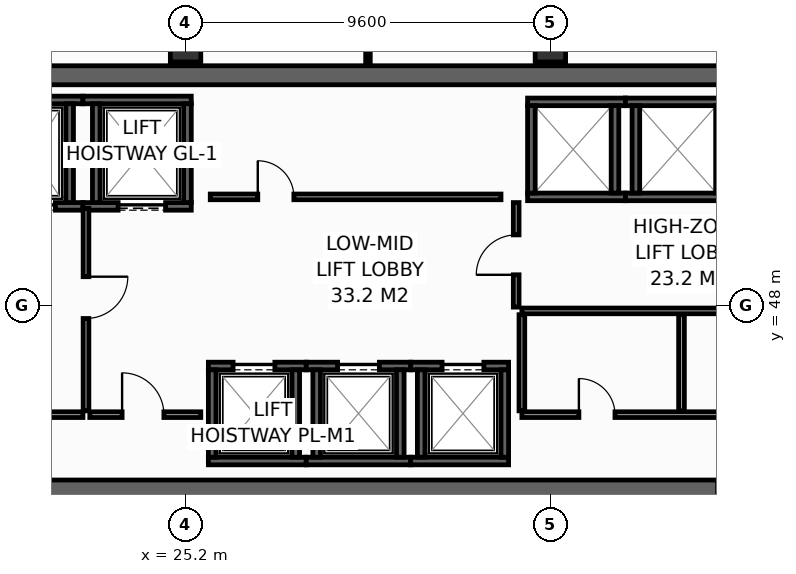
"""IFC4 building model, lengths in metres.
Left out: names, types, materials, properties, quantities, classifications, styles, units other than length and angle.
Written with IfcOpenShell. Run it as: python <this file> out.ifc"""

import sys

from ifc_helpers import new_model, si_unit, direction, frame, frame_2d, origin, origin_2d, place, context, subcontext, project, spatial, rectangle, hollow_rectangle, extrude, element, fill, save


model = new_model("IFC4")
c1 = context("Model", 3, precision=1e-05, world=origin(), true_north=direction((0.0, 1.0)))
c2 = subcontext(c1, "Body", "Model", "MODEL_VIEW")
j1 = project(units=[si_unit("LENGTHUNIT", "METRE"), si_unit("PLANEANGLEUNIT", "RADIAN")], contexts=[c1])
p1 = place(None, origin())
s1 = spatial("IfcSite", under=j1, at=p1, CompositionType="ELEMENT")
p2 = place(p1, origin())
s2 = spatial("IfcBuilding", under=s1, at=p2, CompositionType="ELEMENT")
p3 = place(p2, frame((0.0, 0.0, 190.4)))
s3 = spatial("IfcBuildingStorey", under=s2, at=p3, CompositionType="ELEMENT", Elevation=190.4)
p4 = place(p3, frame((13.6, 43.15, 0.0), z_axis=(0.0, 0.0, 1.0), x_axis=(1.0, 0.0, 0.0)))
e1 = element("IfcWall", 1, at=p4, inside=s3, PredefinedType="SHEAR", context=c2, shape_type="SweptSolid", body=[
    extrude(rectangle(XDim=32.7, YDim=0.5, at=frame_2d((16.35, 0.0))), origin(), (0.0, 0.0, 1.0), 3.55),
])
p5 = place(p4, frame((5.4, 0.0, 0.0)))
e2 = element("IfcOpeningElement", 2, at=p5, cuts=e1, PredefinedType="OPENING", context=c2, shape_type="SweptSolid", body=[
    extrude(rectangle(XDim=1.1, YDim=2.15, at=frame_2d((0.55, 1.075))), frame((0.0, 0.26, 0.0), z_axis=(0.0, -1.0, 0.0), x_axis=(1.0, 0.0, 0.0)), (0.0, 0.0, 1.0), 0.52),
])
p6 = place(p4, frame((25.6, 0.0, 0.0)))
e3 = element("IfcOpeningElement", 3, at=p6, cuts=e1, PredefinedType="OPENING", context=c2, shape_type="SweptSolid", body=[
    extrude(rectangle(XDim=1.1, YDim=2.15, at=frame_2d((0.55, 1.075))), frame((0.0, 0.26, 0.0), z_axis=(0.0, -1.0, 0.0), x_axis=(1.0, 0.0, 0.0)), (0.0, 0.0, 1.0), 0.52),
])
p7 = place(p3, frame((13.6, 54.05, 0.0), z_axis=(0.0, 0.0, 1.0), x_axis=(1.0, 0.0, 0.0)))
e4 = element("IfcWall", 4, at=p7, inside=s3, PredefinedType="SHEAR", context=c2, shape_type="SweptSolid", body=[
    extrude(rectangle(XDim=32.7, YDim=0.5, at=frame_2d((16.35, 0.0))), origin(), (0.0, 0.0, 1.0), 3.55),
])
for number, where, z_axis, x_axis in (
    (5, (25.2, 54.8, 0.0), (0.0, 0.0, 1.0), (1.0, 0.0, 0.0)),
    (6, (34.8, 54.8, 0.0), (0.0, 0.0, 1.0), (1.0, 0.0, 0.0)),
):
    element("IfcColumn", number, at=place(p3, frame(where, z_axis=z_axis, x_axis=x_axis)), inside=s3, PredefinedType="COLUMN", context=c2, shape_type="SweptSolid", body=[
        extrude(hollow_rectangle(XDim=0.8, YDim=0.8, WallThickness=0.036, at=origin_2d()), origin(), (0.0, 0.0, 1.0), 3.8),
    ])
p8 = place(p3, frame((19.85, 50.6, 0.0), z_axis=(0.0, 0.0, 1.0), x_axis=(1.0, 0.0, 0.0)))
e7 = element("IfcWall", 7, at=p8, inside=s3, PredefinedType="SHEAR", context=c2, shape_type="SweptSolid", body=[
    extrude(rectangle(XDim=2.65, YDim=0.2, at=frame_2d((1.325, 0.0))), origin(), (0.0, 0.0, 1.0), 3.55),
])
p9 = place(p8, frame((0.675, 0.0, 0.0)))
e8 = element("IfcOpeningElement", 8, at=p9, cuts=e7, PredefinedType="OPENING", context=c2, shape_type="SweptSolid", body=[
    extrude(rectangle(XDim=1.25, YDim=2.3, at=frame_2d((0.625, 1.15))), frame((0.0, 0.11, 0.0), z_axis=(0.0, -1.0, 0.0), x_axis=(1.0, 0.0, 0.0)), (0.0, 0.0, 1.0), 0.22),
])
p10 = place(p3, frame((19.85, 53.4, 0.0), z_axis=(0.0, 0.0, 1.0), x_axis=(1.0, 0.0, 0.0)))
e9 = element("IfcWall", 9, at=p10, inside=s3, PredefinedType="SHEAR", context=c2, shape_type="SweptSolid", body=[
    extrude(rectangle(XDim=2.65, YDim=0.2, at=frame_2d((1.325, 0.0))), origin(), (0.0, 0.0, 1.0), 3.55),
])
p11 = place(p3, frame((22.15, 50.7, 0.0), z_axis=(0.0, 0.0, 1.0), x_axis=(0.0, 1.0, 0.0)))
e10 = element("IfcWall", 10, at=p11, inside=s3, PredefinedType="SHEAR", context=c2, shape_type="SweptSolid", body=[
    extrude(rectangle(XDim=2.6, YDim=0.2, at=frame_2d((1.3, 0.0))), origin(), (0.0, 0.0, 1.0), 3.55),
])
p12 = place(p3, frame((22.5, 50.6, 0.0), z_axis=(0.0, 0.0, 1.0), x_axis=(1.0, 0.0, 0.0)))
e11 = element("IfcWall", 11, at=p12, inside=s3, PredefinedType="SHEAR", context=c2, shape_type="SweptSolid", body=[
    extrude(rectangle(XDim=2.85, YDim=0.2, at=frame_2d((1.425, 0.0))), origin(), (0.0, 0.0, 1.0), 3.55),
])
p13 = place(p12, frame((0.925, 0.0, 0.0)))
e12 = element("IfcOpeningElement", 12, at=p13, cuts=e11, PredefinedType="OPENING", context=c2, shape_type="SweptSolid", body=[
    extrude(rectangle(XDim=1.25, YDim=2.3, at=frame_2d((0.625, 1.15))), frame((0.0, 0.11, 0.0), z_axis=(0.0, -1.0, 0.0), x_axis=(1.0, 0.0, 0.0)), (0.0, 0.0, 1.0), 0.22),
])
p14 = place(p3, frame((22.5, 53.4, 0.0), z_axis=(0.0, 0.0, 1.0), x_axis=(1.0, 0.0, 0.0)))
e13 = element("IfcWall", 13, at=p14, inside=s3, PredefinedType="SHEAR", context=c2, shape_type="SweptSolid", body=[
    extrude(rectangle(XDim=2.85, YDim=0.2, at=frame_2d((1.425, 0.0))), origin(), (0.0, 0.0, 1.0), 3.55),
])
for number, where, z_axis, x_axis in (
    (14, (22.85, 50.7, 0.0), (0.0, 0.0, 1.0), (0.0, 1.0, 0.0)),
    (15, (25.25, 50.7, 0.0), (0.0, 0.0, 1.0), (0.0, 1.0, 0.0)),
):
    element("IfcWall", number, at=place(p3, frame(where, z_axis=z_axis, x_axis=x_axis)), inside=s3, PredefinedType="SHEAR", context=c2, shape_type="SweptSolid", body=[
        extrude(rectangle(XDim=2.6, YDim=0.2, at=frame_2d((1.3, 0.0))), origin(), (0.0, 0.0, 1.0), 3.55),
    ])
p15 = place(p3, frame((25.8, 43.9, 0.0), z_axis=(0.0, 0.0, 1.0), x_axis=(1.0, 0.0, 0.0)))
e16 = element("IfcWall", 16, at=p15, inside=s3, PredefinedType="SHEAR", context=c2, shape_type="SweptSolid", body=[
    extrude(rectangle(XDim=2.575, YDim=0.2, at=frame_2d((1.288, 0.0))), origin(), (0.0, 0.0, 1.0), 3.55),
])
p16 = place(p3, frame((25.8, 46.4, 0.0), z_axis=(0.0, 0.0, 1.0), x_axis=(1.0, 0.0, 0.0)))
e17 = element("IfcWall", 17, at=p16, inside=s3, PredefinedType="SHEAR", context=c2, shape_type="SweptSolid", body=[
    extrude(rectangle(XDim=2.575, YDim=0.2, at=frame_2d((1.288, 0.0))), origin(), (0.0, 0.0, 1.0), 3.55),
])
p17 = place(p16, frame((0.65, 0.0, 0.0)))
e18 = element("IfcOpeningElement", 18, at=p17, cuts=e17, PredefinedType="OPENING", context=c2, shape_type="SweptSolid", body=[
    extrude(rectangle(XDim=1.1, YDim=2.2, at=frame_2d((0.55, 1.1))), frame((0.0, 0.11, 0.0), z_axis=(0.0, -1.0, 0.0), x_axis=(1.0, 0.0, 0.0)), (0.0, 0.0, 1.0), 0.22),
])
for number, where, z_axis, x_axis in (
    (19, (25.9, 44.0, 0.0), (0.0, 0.0, 1.0), (0.0, 1.0, 0.0)),
    (20, (28.1, 44.0, 0.0), (0.0, 0.0, 1.0), (0.0, 1.0, 0.0)),
):
    element("IfcWall", number, at=place(p3, frame(where, z_axis=z_axis, x_axis=x_axis)), inside=s3, PredefinedType="SHEAR", context=c2, shape_type="SweptSolid", body=[
        extrude(rectangle(XDim=2.3, YDim=0.2, at=frame_2d((1.15, 0.0))), origin(), (0.0, 0.0, 1.0), 3.55),
    ])
p18 = place(p3, frame((28.375, 43.9, 0.0), z_axis=(0.0, 0.0, 1.0), x_axis=(1.0, 0.0, 0.0)))
e21 = element("IfcWall", 21, at=p18, inside=s3, PredefinedType="SHEAR", context=c2, shape_type="SweptSolid", body=[
    extrude(rectangle(XDim=2.75, YDim=0.2, at=frame_2d((1.375, 0.0))), origin(), (0.0, 0.0, 1.0), 3.55),
])
p19 = place(p3, frame((28.375, 46.4, 0.0), z_axis=(0.0, 0.0, 1.0), x_axis=(1.0, 0.0, 0.0)))
e22 = element("IfcWall", 22, at=p19, inside=s3, PredefinedType="SHEAR", context=c2, shape_type="SweptSolid", body=[
    extrude(rectangle(XDim=2.75, YDim=0.2, at=frame_2d((1.375, 0.0))), origin(), (0.0, 0.0, 1.0), 3.55),
])
p20 = place(p19, frame((0.825, 0.0, 0.0)))
e23 = element("IfcOpeningElement", 23, at=p20, cuts=e22, PredefinedType="OPENING", context=c2, shape_type="SweptSolid", body=[
    extrude(rectangle(XDim=1.1, YDim=2.2, at=frame_2d((0.55, 1.1))), frame((0.0, 0.11, 0.0), z_axis=(0.0, -1.0, 0.0), x_axis=(1.0, 0.0, 0.0)), (0.0, 0.0, 1.0), 0.22),
])
for number, where, z_axis, x_axis in (
    (24, (28.65, 44.0, 0.0), (0.0, 0.0, 1.0), (0.0, 1.0, 0.0)),
    (25, (30.85, 44.0, 0.0), (0.0, 0.0, 1.0), (0.0, 1.0, 0.0)),
):
    element("IfcWall", number, at=place(p3, frame(where, z_axis=z_axis, x_axis=x_axis)), inside=s3, PredefinedType="SHEAR", context=c2, shape_type="SweptSolid", body=[
        extrude(rectangle(XDim=2.3, YDim=0.2, at=frame_2d((1.15, 0.0))), origin(), (0.0, 0.0, 1.0), 3.55),
    ])
p21 = place(p3, frame((31.125, 43.9, 0.0), z_axis=(0.0, 0.0, 1.0), x_axis=(1.0, 0.0, 0.0)))
e26 = element("IfcWall", 26, at=p21, inside=s3, PredefinedType="SHEAR", context=c2, shape_type="SweptSolid", body=[
    extrude(rectangle(XDim=2.575, YDim=0.2, at=frame_2d((1.288, 0.0))), origin(), (0.0, 0.0, 1.0), 3.55),
])
p22 = place(p3, frame((31.125, 46.4, 0.0), z_axis=(0.0, 0.0, 1.0), x_axis=(1.0, 0.0, 0.0)))
e27 = element("IfcWall", 27, at=p22, inside=s3, PredefinedType="SHEAR", context=c2, shape_type="SweptSolid", body=[
    extrude(rectangle(XDim=2.575, YDim=0.2, at=frame_2d((1.288, 0.0))), origin(), (0.0, 0.0, 1.0), 3.55),
])
p23 = place(p22, frame((0.825, 0.0, 0.0)))
e28 = element("IfcOpeningElement", 28, at=p23, cuts=e27, PredefinedType="OPENING", context=c2, shape_type="SweptSolid", body=[
    extrude(rectangle(XDim=1.1, YDim=2.2, at=frame_2d((0.55, 1.1))), frame((0.0, 0.11, 0.0), z_axis=(0.0, -1.0, 0.0), x_axis=(1.0, 0.0, 0.0)), (0.0, 0.0, 1.0), 0.22),
])
for number, where, z_axis, x_axis in (
    (29, (31.4, 44.0, 0.0), (0.0, 0.0, 1.0), (0.0, 1.0, 0.0)),
    (30, (33.6, 44.0, 0.0), (0.0, 0.0, 1.0), (0.0, 1.0, 0.0)),
):
    element("IfcWall", number, at=place(p3, frame(where, z_axis=z_axis, x_axis=x_axis)), inside=s3, PredefinedType="SHEAR", context=c2, shape_type="SweptSolid", body=[
        extrude(rectangle(XDim=2.3, YDim=0.2, at=frame_2d((1.15, 0.0))), origin(), (0.0, 0.0, 1.0), 3.55),
    ])
for number, where, z_axis, x_axis in (
    (31, (34.2, 50.85, 0.0), (0.0, 0.0, 1.0), (1.0, 0.0, 0.0)),
    (32, (34.2, 53.35, 0.0), (0.0, 0.0, 1.0), (1.0, 0.0, 0.0)),
):
    element("IfcWall", number, at=place(p3, frame(where, z_axis=z_axis, x_axis=x_axis)), inside=s3, PredefinedType="SHEAR", context=c2, shape_type="SweptSolid", body=[
        extrude(rectangle(XDim=2.575, YDim=0.2, at=frame_2d((1.288, 0.0))), origin(), (0.0, 0.0, 1.0), 3.55),
    ])
for number, where, z_axis, x_axis in (
    (33, (34.3, 50.95, 0.0), (0.0, 0.0, 1.0), (0.0, 1.0, 0.0)),
    (34, (36.5, 50.95, 0.0), (0.0, 0.0, 1.0), (0.0, 1.0, 0.0)),
):
    element("IfcWall", number, at=place(p3, frame(where, z_axis=z_axis, x_axis=x_axis)), inside=s3, PredefinedType="SHEAR", context=c2, shape_type="SweptSolid", body=[
        extrude(rectangle(XDim=2.3, YDim=0.2, at=frame_2d((1.15, 0.0))), origin(), (0.0, 0.0, 1.0), 3.55),
    ])
for number, where, z_axis, x_axis in (
    (35, (36.775, 50.85, 0.0), (0.0, 0.0, 1.0), (1.0, 0.0, 0.0)),
    (36, (36.775, 53.35, 0.0), (0.0, 0.0, 1.0), (1.0, 0.0, 0.0)),
):
    element("IfcWall", number, at=place(p3, frame(where, z_axis=z_axis, x_axis=x_axis)), inside=s3, PredefinedType="SHEAR", context=c2, shape_type="SweptSolid", body=[
        extrude(rectangle(XDim=2.75, YDim=0.2, at=frame_2d((1.375, 0.0))), origin(), (0.0, 0.0, 1.0), 3.55),
    ])
p24 = place(p3, frame((37.05, 50.95, 0.0), z_axis=(0.0, 0.0, 1.0), x_axis=(0.0, 1.0, 0.0)))
e37 = element("IfcWall", 37, at=p24, inside=s3, PredefinedType="SHEAR", context=c2, shape_type="SweptSolid", body=[
    extrude(rectangle(XDim=2.3, YDim=0.2, at=frame_2d((1.15, 0.0))), origin(), (0.0, 0.0, 1.0), 3.55),
])
p25 = place(p3, frame((17.36, 45.12, 0.0), z_axis=(0.0, 0.0, 1.0), x_axis=(1.0, 0.0, 0.0)))
e38 = element("IfcWall", 38, at=p25, inside=s3, PredefinedType="PARTITIONING", context=c2, shape_type="SweptSolid", body=[
    extrude(rectangle(XDim=5.14, YDim=0.15, at=frame_2d((2.57, 0.0))), origin(), (0.0, 0.0, 1.0), 3.55),
])
p26 = place(p25, frame((1.8, 0.0, 0.0)))
e39 = element("IfcOpeningElement", 39, at=p26, cuts=e38, PredefinedType="OPENING", context=c2, shape_type="SweptSolid", body=[
    extrude(rectangle(XDim=1.1, YDim=2.15, at=frame_2d((0.55, 1.075))), frame((0.0, 0.085, 0.0), z_axis=(0.0, -1.0, 0.0), x_axis=(1.0, 0.0, 0.0)), (0.0, 0.0, 1.0), 0.17),
])
p27 = place(p3, frame((22.58, 50.55, 0.0), z_axis=(0.0, 0.0, 1.0), x_axis=(0.0, -1.0, 0.0)))
e40 = element("IfcWall", 40, at=p27, inside=s3, PredefinedType="PARTITIONING", context=c2, shape_type="SweptSolid", body=[
    extrude(rectangle(XDim=5.33, YDim=0.15, at=frame_2d((2.665, 0.0))), origin(), (0.0, 0.0, 1.0), 3.55),
])
p28 = place(p27, frame((1.8, 0.0, 0.0)))
e41 = element("IfcOpeningElement", 41, at=p28, cuts=e40, PredefinedType="OPENING", context=c2, shape_type="SweptSolid", body=[
    extrude(rectangle(XDim=1.1, YDim=2.15, at=frame_2d((0.55, 1.075))), frame((0.0, 0.085, 0.0), z_axis=(0.0, -1.0, 0.0), x_axis=(1.0, 0.0, 0.0)), (0.0, 0.0, 1.0), 0.17),
])
p29 = place(p3, frame((22.68, 45.12, 0.0), z_axis=(0.0, 0.0, 1.0), x_axis=(1.0, 0.0, 0.0)))
e42 = element("IfcWall", 42, at=p29, inside=s3, PredefinedType="PARTITIONING", context=c2, shape_type="SweptSolid", body=[
    extrude(rectangle(XDim=2.92, YDim=0.15, at=frame_2d((1.46, 0.0))), origin(), (0.0, 0.0, 1.0), 3.55),
])
p30 = place(p29, frame((0.85, 0.0, 0.0)))
e43 = element("IfcOpeningElement", 43, at=p30, cuts=e42, PredefinedType="OPENING", context=c2, shape_type="SweptSolid", body=[
    extrude(rectangle(XDim=1.1, YDim=2.15, at=frame_2d((0.55, 1.075))), frame((0.0, 0.085, 0.0), z_axis=(0.0, -1.0, 0.0), x_axis=(1.0, 0.0, 0.0)), (0.0, 0.0, 1.0), 0.17),
])
p31 = place(p3, frame((33.9, 47.95, 0.0), z_axis=(0.0, 0.0, 1.0), x_axis=(0.0, 1.0, 0.0)))
e44 = element("IfcWall", 44, at=p31, inside=s3, PredefinedType="PARTITIONING", context=c2, shape_type="SweptSolid", body=[
    extrude(rectangle(XDim=2.75, YDim=0.15, at=frame_2d((1.375, 0.0))), origin(), (0.0, 0.0, 1.0), 3.55),
])
p32 = place(p31, frame((0.85, 0.0, 0.0)))
e45 = element("IfcOpeningElement", 45, at=p32, cuts=e44, PredefinedType="OPENING", context=c2, shape_type="SweptSolid", body=[
    extrude(rectangle(XDim=1.05, YDim=2.15, at=frame_2d((0.525, 1.075))), frame((0.0, 0.085, 0.0), z_axis=(0.0, -1.0, 0.0), x_axis=(1.0, 0.0, 0.0)), (0.0, 0.0, 1.0), 0.17),
])
p33 = place(p3, frame((34.05, 45.12, 0.0), z_axis=(0.0, 0.0, 1.0), x_axis=(1.0, 0.0, 0.0)))
e46 = element("IfcWall", 46, at=p33, inside=s3, PredefinedType="PARTITIONING", context=c2, shape_type="SweptSolid", body=[
    extrude(rectangle(XDim=8.45, YDim=0.15, at=frame_2d((4.225, 0.0))), origin(), (0.0, 0.0, 1.0), 3.55),
])
p34 = place(p33, frame((1.5, 0.0, 0.0)))
e47 = element("IfcOpeningElement", 47, at=p34, cuts=e46, PredefinedType="OPENING", context=c2, shape_type="SweptSolid", body=[
    extrude(rectangle(XDim=0.95, YDim=2.15, at=frame_2d((0.475, 1.075))), frame((0.0, 0.085, 0.0), z_axis=(0.0, -1.0, 0.0), x_axis=(1.0, 0.0, 0.0)), (0.0, 0.0, 1.0), 0.17),
])
p35 = place(p33, frame((5.8, 0.0, 0.0)))
e48 = element("IfcOpeningElement", 48, at=p35, cuts=e46, PredefinedType="OPENING", context=c2, shape_type="SweptSolid", body=[
    extrude(rectangle(XDim=0.95, YDim=2.15, at=frame_2d((0.475, 1.075))), frame((0.0, 0.085, 0.0), z_axis=(0.0, -1.0, 0.0), x_axis=(1.0, 0.0, 0.0)), (0.0, 0.0, 1.0), 0.17),
])
p36 = place(p3, frame((34.05, 47.85, 0.0), z_axis=(0.0, 0.0, 1.0), x_axis=(1.0, 0.0, 0.0)))
e49 = element("IfcWall", 49, at=p36, inside=s3, PredefinedType="PARTITIONING", context=c2, shape_type="SweptSolid", body=[
    extrude(rectangle(XDim=8.45, YDim=0.15, at=frame_2d((4.225, 0.0))), origin(), (0.0, 0.0, 1.0), 3.55),
])
for number, where, z_axis, x_axis in (
    (50, (38.25, 45.22, 0.0), (0.0, 0.0, 1.0), (0.0, 1.0, 0.0)),
    (51, (34.05, 45.22, 0.0), (0.0, 0.0, 1.0), (0.0, 1.0, 0.0)),
):
    element("IfcWall", number, at=place(p3, frame(where, z_axis=z_axis, x_axis=x_axis)), inside=s3, PredefinedType="PARTITIONING", context=c2, shape_type="SweptSolid", body=[
        extrude(rectangle(XDim=2.53, YDim=0.15, at=frame_2d((1.265, 0.0))), origin(), (0.0, 0.0, 1.0), 3.55),
    ])
p37 = place(p3, frame((25.85, 50.85, 0.0), z_axis=(0.0, 0.0, 1.0), x_axis=(1.0, 0.0, 0.0)))
e52 = element("IfcWall", 52, at=p37, inside=s3, PredefinedType="PARTITIONING", context=c2, shape_type="SweptSolid", body=[
    extrude(rectangle(XDim=7.65, YDim=0.15, at=frame_2d((3.825, 0.0))), origin(), (0.0, 0.0, 1.0), 3.55),
])
p38 = place(p37, frame((1.25, 0.0, 0.0)))
e53 = element("IfcOpeningElement", 53, at=p38, cuts=e52, PredefinedType="OPENING", context=c2, shape_type="SweptSolid", body=[
    extrude(rectangle(XDim=0.95, YDim=2.15, at=frame_2d((0.475, 1.075))), frame((0.0, 0.085, 0.0), z_axis=(0.0, -1.0, 0.0), x_axis=(1.0, 0.0, 0.0)), (0.0, 0.0, 1.0), 0.17),
])
p39 = place(p3, frame((30.0, 54.32, 0.0), z_axis=(0.0, 0.0, 1.0), x_axis=(0.0, 1.0, 0.0)))
e54 = element("IfcWall", 54, at=p39, inside=s3, PredefinedType="PARTITIONING", context=c2, shape_type="SweptSolid", body=[
    extrude(rectangle(XDim=1.675, YDim=0.12, at=frame_2d((0.837, 0.0))), origin(), (0.0, 0.0, 1.0), 2.935),
])
p40 = place(p9, origin())
e55 = element("IfcDoor", 55, at=p40, inside=s3, OperationType="SLIDING_TO_LEFT", PredefinedType="DOOR", context=c2, shape_type="SweptSolid", body=[
    extrude(rectangle(XDim=1.25, YDim=2.3, at=frame_2d((0.625, 1.15))), frame((0.0, 0.025, 0.0), z_axis=(0.0, -1.0, 0.0), x_axis=(1.0, 0.0, 0.0)), (0.0, 0.0, 1.0), 0.05),
])
fill(e8, e55)
p41 = place(p13, origin())
e56 = element("IfcDoor", 56, at=p41, inside=s3, OperationType="SLIDING_TO_LEFT", PredefinedType="DOOR", context=c2, shape_type="SweptSolid", body=[
    extrude(rectangle(XDim=1.25, YDim=2.3, at=frame_2d((0.625, 1.15))), frame((0.0, 0.025, 0.0), z_axis=(0.0, -1.0, 0.0), x_axis=(1.0, 0.0, 0.0)), (0.0, 0.0, 1.0), 0.05),
])
fill(e12, e56)
p42 = place(p17, origin())
e57 = element("IfcDoor", 57, at=p42, inside=s3, OperationType="SLIDING_TO_LEFT", PredefinedType="DOOR", context=c2, shape_type="SweptSolid", body=[
    extrude(rectangle(XDim=1.1, YDim=2.2, at=frame_2d((0.55, 1.1))), frame((0.0, 0.025, 0.0), z_axis=(0.0, -1.0, 0.0), x_axis=(1.0, 0.0, 0.0)), (0.0, 0.0, 1.0), 0.05),
])
fill(e18, e57)
p43 = place(p20, origin())
e58 = element("IfcDoor", 58, at=p43, inside=s3, OperationType="SLIDING_TO_LEFT", PredefinedType="DOOR", context=c2, shape_type="SweptSolid", body=[
    extrude(rectangle(XDim=1.1, YDim=2.2, at=frame_2d((0.55, 1.1))), frame((0.0, 0.025, 0.0), z_axis=(0.0, -1.0, 0.0), x_axis=(1.0, 0.0, 0.0)), (0.0, 0.0, 1.0), 0.05),
])
fill(e23, e58)
p44 = place(p23, origin())
e59 = element("IfcDoor", 59, at=p44, inside=s3, OperationType="SLIDING_TO_LEFT", PredefinedType="DOOR", context=c2, shape_type="SweptSolid", body=[
    extrude(rectangle(XDim=1.1, YDim=2.2, at=frame_2d((0.55, 1.1))), frame((0.0, 0.025, 0.0), z_axis=(0.0, -1.0, 0.0), x_axis=(1.0, 0.0, 0.0)), (0.0, 0.0, 1.0), 0.05),
])
fill(e28, e59)
p45 = place(p28, origin())
e60 = element("IfcDoor", 60, at=p45, inside=s3, OperationType="SINGLE_SWING_LEFT", PredefinedType="DOOR", context=c2, shape_type="SweptSolid", body=[
    extrude(rectangle(XDim=1.1, YDim=2.15, at=frame_2d((0.55, 1.075))), frame((0.0, 0.025, 0.0), z_axis=(0.0, -1.0, 0.0), x_axis=(1.0, 0.0, 0.0)), (0.0, 0.0, 1.0), 0.05),
])
fill(e41, e60)
p46 = place(p30, origin())
e61 = element("IfcDoor", 61, at=p46, inside=s3, OperationType="SINGLE_SWING_LEFT", PredefinedType="DOOR", context=c2, shape_type="SweptSolid", body=[
    extrude(rectangle(XDim=1.1, YDim=2.15, at=frame_2d((0.55, 1.075))), frame((0.0, 0.025, 0.0), z_axis=(0.0, -1.0, 0.0), x_axis=(1.0, 0.0, 0.0)), (0.0, 0.0, 1.0), 0.05),
])
fill(e43, e61)
p47 = place(p32, origin())
e62 = element("IfcDoor", 62, at=p47, inside=s3, OperationType="SINGLE_SWING_LEFT", PredefinedType="DOOR", context=c2, shape_type="SweptSolid", body=[
    extrude(rectangle(XDim=1.05, YDim=2.15, at=frame_2d((0.525, 1.075))), frame((0.0, 0.025, 0.0), z_axis=(0.0, -1.0, 0.0), x_axis=(1.0, 0.0, 0.0)), (0.0, 0.0, 1.0), 0.05),
])
fill(e45, e62)
p48 = place(p34, origin())
e63 = element("IfcDoor", 63, at=p48, inside=s3, OperationType="SINGLE_SWING_LEFT", PredefinedType="DOOR", context=c2, shape_type="SweptSolid", body=[
    extrude(rectangle(XDim=0.95, YDim=2.15, at=frame_2d((0.475, 1.075))), frame((0.0, 0.025, 0.0), z_axis=(0.0, -1.0, 0.0), x_axis=(1.0, 0.0, 0.0)), (0.0, 0.0, 1.0), 0.05),
])
fill(e47, e63)
p49 = place(p38, origin())
e64 = element("IfcDoor", 64, at=p49, inside=s3, OperationType="SINGLE_SWING_LEFT", PredefinedType="DOOR", context=c2, shape_type="SweptSolid", body=[
    extrude(rectangle(XDim=0.95, YDim=2.15, at=frame_2d((0.475, 1.075))), frame((0.0, 0.025, 0.0), z_axis=(0.0, -1.0, 0.0), x_axis=(1.0, 0.0, 0.0)), (0.0, 0.0, 1.0), 0.05),
])
fill(e53, e64)
save(model, sys.argv[1])
